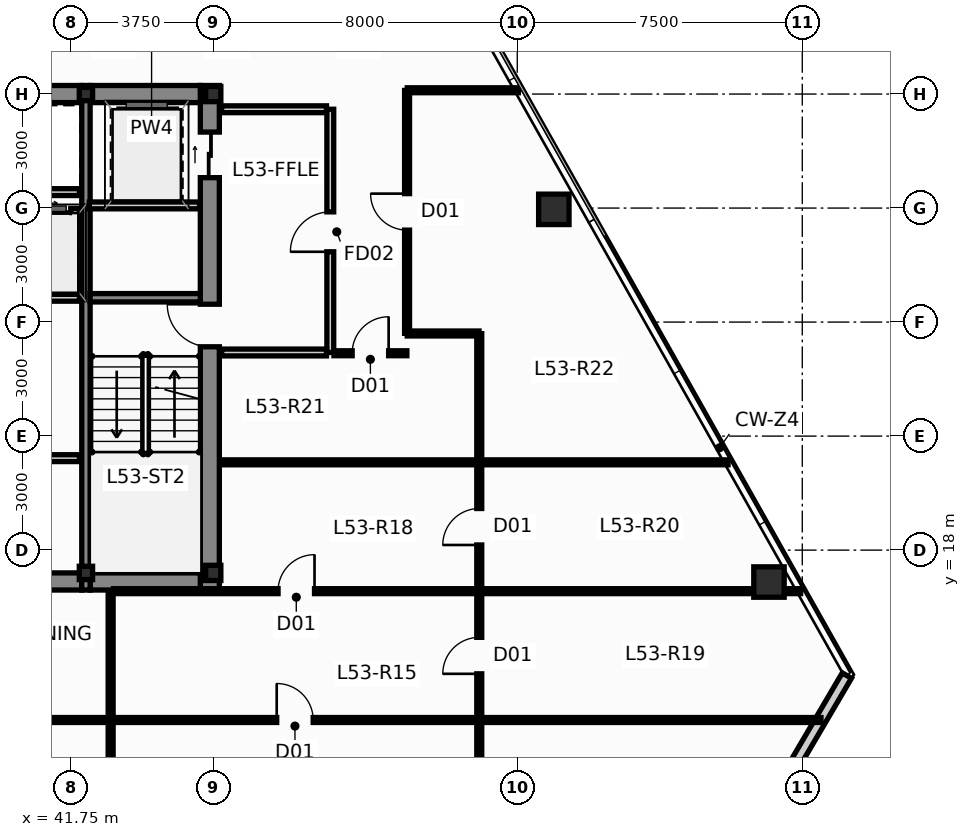
"""IFC4 building model, lengths in metres.
Left out: names, types, materials, properties, quantities, classifications, styles, units other than length and angle.
Written with IfcOpenShell. Run it as: python <this file> out.ifc"""

import sys

from ifc_helpers import new_model, si_unit, direction, frame, frame_2d, origin, origin_2d, place, context, subcontext, project, spatial, rectangle, hollow_rectangle, i_section, extrude, source, transform, mapped, element, fill, save


model = new_model("IFC4")
c1 = context("Model", 3, precision=1e-05, world=origin(), true_north=direction((0.0, 1.0)))
c2 = subcontext(c1, "Body", "Model", "MODEL_VIEW")
j1 = project(units=[si_unit("LENGTHUNIT", "METRE"), si_unit("PLANEANGLEUNIT", "RADIAN")], contexts=[c1])
p1 = place(None, origin())
s1 = spatial("IfcSite", under=j1, at=p1, CompositionType="ELEMENT")
p2 = place(p1, origin())
s2 = spatial("IfcBuilding", under=s1, at=p2, CompositionType="ELEMENT")
p3 = place(p2, frame((0.0, 0.0, 202.3)))
s3 = spatial("IfcBuildingStorey", under=s2, at=p3, CompositionType="ELEMENT", Elevation=202.3)
m1 = source(origin(), c2, "Body", "SweptSolid", [
    extrude(i_section(OverallWidth=0.4, OverallDepth=0.4, WebThickness=0.02, FlangeThickness=0.032, at=origin_2d()), origin(), (0.0, 0.0, 1.0), 3.65),
])
for number, where, z_axis, x_axis in (
    (1, (45.5, 17.4, 0.0), (0.0, 0.0, 1.0), (1.0, 0.0, 0.0)),
    (2, (45.5, 30.0, 0.0), (0.0, 0.0, 1.0), (1.0, 0.0, 0.0)),
):
    element("IfcColumn", number, at=place(p3, frame(where, z_axis=z_axis, x_axis=x_axis)), inside=s3, PredefinedType="COLUMN", context=c2, shape_type="MappedRepresentation", body=[
        mapped(m1, transform((0.0, 0.0, 0.0), scale=1.0)),
    ])
m2 = source(origin(), c2, "Body", "SweptSolid", [
    extrude(hollow_rectangle(XDim=0.35, YDim=0.35, WallThickness=0.016, at=origin_2d()), origin(), (0.0, 0.0, 1.0), 3.65),
])
for number, where, z_axis, x_axis in (
    (3, (42.15, 17.4, 0.0), (0.0, 0.0, 1.0), (1.0, 0.0, 0.0)),
    (4, (42.15, 30.0, 0.0), (0.0, 0.0, 1.0), (1.0, 0.0, 0.0)),
):
    element("IfcColumn", number, at=place(p3, frame(where, z_axis=z_axis, x_axis=x_axis)), inside=s3, PredefinedType="COLUMN", context=c2, shape_type="MappedRepresentation", body=[
        mapped(m2, transform((0.0, 0.0, 0.0), scale=1.0)),
    ])
p4 = place(p3, frame((45.41, 16.95, 0.0), z_axis=(0.0, 0.0, 1.0), x_axis=(0.0, 1.0, 0.0)))
e5 = element("IfcWall", 5, at=p4, inside=s3, PredefinedType="SHEAR", context=c2, shape_type="SweptSolid", body=[
    extrude(rectangle(XDim=13.275, YDim=0.5, at=frame_2d((6.638, 0.0))), origin(), (0.0, 0.0, 1.0), 3.65),
])
p5 = place(p4, frame((6.4, 0.0, 0.0)))
e6 = element("IfcOpeningElement", 6, at=p5, cuts=e5, PredefinedType="OPENING", context=c2, shape_type="SweptSolid", body=[
    extrude(rectangle(XDim=1.12, YDim=2.15, at=frame_2d((0.56, 1.075))), frame((0.0, 0.262, 0.0), z_axis=(0.0, -1.0, 0.0), x_axis=(1.0, 0.0, 0.0)), (0.0, 0.0, 1.0), 0.524),
])
p6 = place(p4, frame((10.85, 0.0, 0.0)))
e7 = element("IfcOpeningElement", 7, at=p6, cuts=e5, PredefinedType="OPENING", context=c2, shape_type="SweptSolid", body=[
    extrude(rectangle(XDim=1.2, YDim=2.2, at=frame_2d((0.6, 1.1))), frame((0.0, 0.262, 0.0), z_axis=(0.0, -1.0, 0.0), x_axis=(1.0, 0.0, 0.0)), (0.0, 0.0, 1.0), 0.524),
])
p7 = place(p3, frame((33.96, 17.175, 0.0), z_axis=(0.0, 0.0, 1.0), x_axis=(1.0, 0.0, 0.0)))
e8 = element("IfcWall", 8, at=p7, inside=s3, PredefinedType="SHEAR", context=c2, shape_type="SweptSolid", body=[
    extrude(rectangle(XDim=8.08, YDim=0.45, at=frame_2d((4.04, 0.0))), origin(), (0.0, 0.0, 1.0), 3.65),
])
p8 = place(p3, frame((42.26, 17.175, 0.0), z_axis=(0.0, 0.0, 1.0), x_axis=(1.0, 0.0, 0.0)))
e9 = element("IfcWall", 9, at=p8, inside=s3, PredefinedType="SHEAR", context=c2, shape_type="SweptSolid", body=[
    extrude(rectangle(XDim=2.9, YDim=0.45, at=frame_2d((1.45, 0.0))), origin(), (0.0, 0.0, 1.0), 3.65),
])
p9 = place(p3, frame((40.16, 30.0, 0.0), z_axis=(0.0, 0.0, 1.0), x_axis=(1.0, 0.0, 0.0)))
e10 = element("IfcWall", 10, at=p9, inside=s3, PredefinedType="SHEAR", context=c2, shape_type="SweptSolid", body=[
    extrude(rectangle(XDim=1.88, YDim=0.45, at=frame_2d((0.94, 0.0))), origin(), (0.0, 0.0, 1.0), 3.65),
])
p10 = place(p3, frame((42.26, 30.0, 0.0), z_axis=(0.0, 0.0, 1.0), x_axis=(1.0, 0.0, 0.0)))
e11 = element("IfcWall", 11, at=p10, inside=s3, PredefinedType="SHEAR", context=c2, shape_type="SweptSolid", body=[
    extrude(rectangle(XDim=2.9, YDim=0.45, at=frame_2d((1.45, 0.0))), origin(), (0.0, 0.0, 1.0), 3.65),
])
p11 = place(p3, frame((42.15, 16.95, 0.0), z_axis=(0.0, 0.0, 1.0), x_axis=(0.0, 1.0, 0.0)))
e12 = element("IfcWall", 12, at=p11, inside=s3, PredefinedType="SHEAR", context=c2, shape_type="SweptSolid", body=[
    extrude(rectangle(XDim=13.275, YDim=0.22, at=frame_2d((6.638, 0.0))), origin(), (0.0, 0.0, 1.0), 3.65),
])
p12 = place(p3, frame((42.26, 24.64, 0.0), z_axis=(0.0, 0.0, 1.0), x_axis=(1.0, 0.0, 0.0)))
e13 = element("IfcWall", 13, at=p12, inside=s3, PredefinedType="SHEAR", context=c2, shape_type="SweptSolid", body=[
    extrude(rectangle(XDim=2.9, YDim=0.22, at=frame_2d((1.45, 0.0))), origin(), (0.0, 0.0, 1.0), 3.65),
])
m3 = source(origin(), c2, "Body", "SweptSolid", [
    extrude(hollow_rectangle(XDim=0.8, YDim=0.8, WallThickness=0.045, at=origin_2d()), origin(), (0.0, 0.0, 1.0), 3.651),
])
p13 = place(p3, frame((60.124, 17.16, 0.0), z_axis=(-0.010431795422, -0.021532295679, 0.999713727968), x_axis=(0.899947055326, -0.435999194506, 0.0)))
e14 = element("IfcColumn", 14, at=p13, inside=s3, PredefinedType="COLUMN", context=c2, shape_type="MappedRepresentation", body=[
    mapped(m3, transform((0.0, 0.0, 0.0), scale=1.0)),
])
m4 = source(origin(), c2, "Body", "SweptSolid", [
    extrude(hollow_rectangle(XDim=0.8, YDim=0.8, WallThickness=0.045, at=origin_2d()), origin(), (0.0, 0.0, 1.0), 3.651),
])
p14 = place(p3, frame((54.462, 26.967, 0.0), z_axis=(-0.014913313399, -0.013776424037, 0.999793880369), x_axis=(0.678553674548, -0.734550822447, 0.0)))
e15 = element("IfcColumn", 15, at=p14, inside=s3, PredefinedType="COLUMN", context=c2, shape_type="MappedRepresentation", body=[
    mapped(m4, transform((0.0, 0.0, 0.0), scale=1.0)),
])
p15 = place(p3, frame((62.173, 14.699, 0.0), z_axis=(0.0, 0.0, 1.0), x_axis=(-0.506361908282, -0.862321064245, 0.0)))
e16 = element("IfcWall", 16, at=p15, inside=s3, PredefinedType="STANDARD", context=c2, shape_type="SweptSolid", body=[
    extrude(rectangle(XDim=8.171, YDim=0.28, at=frame_2d((4.086, 0.0))), origin(), (0.0, 0.0, 1.0), 3.4),
])
p16 = place(p15, frame((2.89, 0.0, 0.9)))
e17 = element("IfcOpeningElement", 17, at=p16, cuts=e16, PredefinedType="OPENING", context=c2, shape_type="SweptSolid", body=[
    extrude(rectangle(XDim=1.5, YDim=1.8, at=frame_2d((0.75, 0.9))), frame((0.0, 0.152, 0.0), z_axis=(0.0, -1.0, 0.0), x_axis=(1.0, 0.0, 0.0)), (0.0, 0.0, 1.0), 0.304),
])
p17 = place(p3, frame((40.28, 26.9, 0.0), z_axis=(0.0, 0.0, 1.0), x_axis=(1.0, 0.0, 0.0)))
e18 = element("IfcWall", 18, at=p17, inside=s3, PredefinedType="PARTITIONING", context=c2, shape_type="SweptSolid", body=[
    extrude(rectangle(XDim=1.7, YDim=0.18, at=frame_2d((0.85, 0.0))), origin(), (0.0, 0.0, 1.0), 3.4),
])
p18 = place(p17, frame((0.32, 0.0, 0.0)))
e19 = element("IfcOpeningElement", 19, at=p18, cuts=e18, PredefinedType="OPENING", context=c2, shape_type="SweptSolid", body=[
    extrude(rectangle(XDim=1.15, YDim=2.2, at=frame_2d((0.575, 1.1))), frame((0.0, 0.102, 0.0), z_axis=(0.0, -1.0, 0.0), x_axis=(1.0, 0.0, 0.0)), (0.0, 0.0, 1.0), 0.204),
])
p19 = place(p3, frame((40.2, 24.64, 0.0), z_axis=(0.0, 0.0, 1.0), x_axis=(1.0, 0.0, 0.0)))
e20 = element("IfcWall", 20, at=p19, inside=s3, PredefinedType="PARTITIONING", context=c2, shape_type="SweptSolid", body=[
    extrude(rectangle(XDim=1.78, YDim=0.18, at=frame_2d((0.89, 0.0))), origin(), (0.0, 0.0, 1.0), 3.4),
])
p20 = place(p3, frame((40.22, 27.42, 0.0), z_axis=(0.0, 0.0, 1.0), x_axis=(1.0, 0.0, 0.0)))
e21 = element("IfcWall", 21, at=p20, inside=s3, PredefinedType="PARTITIONING", context=c2, shape_type="SweptSolid", body=[
    extrude(rectangle(XDim=1.76, YDim=0.18, at=frame_2d((0.88, 0.0))), origin(), (0.0, 0.0, 1.0), 3.4),
])
p21 = place(p3, frame((48.58, 23.2, 0.0), z_axis=(0.0, 0.0, 1.0), x_axis=(0.0, 1.0, 0.0)))
e22 = element("IfcWall", 22, at=p21, inside=s3, PredefinedType="PARTITIONING", context=c2, shape_type="SweptSolid", body=[
    extrude(rectangle(XDim=6.4, YDim=0.18, at=frame_2d((3.2, 0.0))), origin(), (0.0, 0.0, 1.0), 3.078),
])
p22 = place(p21, frame((2.65, 0.0, 0.0)))
e23 = element("IfcOpeningElement", 23, at=p22, cuts=e22, PredefinedType="OPENING", context=c2, shape_type="SweptSolid", body=[
    extrude(rectangle(XDim=1.05, YDim=2.15, at=frame_2d((0.525, 1.075))), frame((0.0, 0.102, 0.0), z_axis=(0.0, -1.0, 0.0), x_axis=(1.0, 0.0, 0.0)), (0.0, 0.0, 1.0), 0.204),
])
p23 = place(p3, frame((45.72, 23.2, 0.0), z_axis=(0.0, 0.0, 1.0), x_axis=(1.0, 0.0, 0.0)))
e24 = element("IfcWall", 24, at=p23, inside=s3, PredefinedType="PARTITIONING", context=c2, shape_type="SweptSolid", body=[
    extrude(rectangle(XDim=2.76, YDim=0.18, at=frame_2d((1.38, 0.0))), origin(), (0.0, 0.0, 1.0), 3.4),
])
p24 = place(p3, frame((45.72, 29.6, 0.0), z_axis=(0.0, 0.0, 1.0), x_axis=(1.0, 0.0, 0.0)))
e25 = element("IfcWall", 25, at=p24, inside=s3, PredefinedType="PARTITIONING", context=c2, shape_type="SweptSolid", body=[
    extrude(rectangle(XDim=2.76, YDim=0.18, at=frame_2d((1.38, 0.0))), origin(), (0.0, 0.0, 1.0), 2.925),
])
p25 = place(p3, frame((42.24, 27.07, 0.0), z_axis=(0.0, 0.0, 1.0), x_axis=(1.0, 0.0, 0.0)))
e26 = element("IfcWall", 26, at=p25, inside=s3, PredefinedType="PARTITIONING", context=c2, shape_type="SweptSolid", body=[
    extrude(rectangle(XDim=2.9, YDim=0.18, at=frame_2d((1.45, 0.0))), origin(), (0.0, 0.0, 1.0), 3.4),
])
p26 = place(p3, frame((40.22, 20.42, 0.0), z_axis=(0.0, 0.0, 1.0), x_axis=(1.0, 0.0, 0.0)))
e27 = element("IfcWall", 27, at=p26, inside=s3, PredefinedType="PARTITIONING", context=c2, shape_type="SweptSolid", body=[
    extrude(rectangle(XDim=1.76, YDim=0.18, at=frame_2d((0.88, 0.0))), origin(), (0.0, 0.0, 1.0), 3.4),
])
p27 = place(p3, frame((42.805, 13.53, 0.0), z_axis=(0.0, 0.0, 1.0), x_axis=(1.0, 0.0, 0.0)))
e28 = element("IfcWall", 28, at=p27, inside=s3, PredefinedType="PARTITIONING", context=c2, shape_type="SweptSolid", body=[
    extrude(rectangle(XDim=9.69, YDim=0.13, at=frame_2d((4.845, 0.0))), origin(), (0.0, 0.0, 1.0), 3.078),
])
p28 = place(p27, frame((4.365, 0.0, 0.0)))
e29 = element("IfcOpeningElement", 29, at=p28, cuts=e28, PredefinedType="OPENING", context=c2, shape_type="SweptSolid", body=[
    extrude(rectangle(XDim=0.96, YDim=2.15, at=frame_2d((0.48, 1.075))), frame((0.0, 0.077, 0.0), z_axis=(0.0, -1.0, 0.0), x_axis=(1.0, 0.0, 0.0)), (0.0, 0.0, 1.0), 0.154),
])
p29 = place(p3, frame((42.875, 16.92, 0.0), z_axis=(0.0, 0.0, 1.0), x_axis=(1.0, 0.0, 0.0)))
e30 = element("IfcWall", 30, at=p29, inside=s3, PredefinedType="PARTITIONING", context=c2, shape_type="SweptSolid", body=[
    extrude(rectangle(XDim=9.62, YDim=0.13, at=frame_2d((4.81, 0.0))), origin(), (0.0, 0.0, 1.0), 2.925),
])
p30 = place(p29, frame((4.33, 0.0, 0.0)))
e31 = element("IfcOpeningElement", 31, at=p30, cuts=e30, PredefinedType="OPENING", context=c2, shape_type="SweptSolid", body=[
    extrude(rectangle(XDim=0.96, YDim=2.15, at=frame_2d((0.48, 1.075))), frame((0.0, 0.077, 0.0), z_axis=(0.0, -1.0, 0.0), x_axis=(1.0, 0.0, 0.0)), (0.0, 0.0, 1.0), 0.154),
])
p31 = place(p3, frame((33.205, 13.53, 0.0), z_axis=(0.0, 0.0, 1.0), x_axis=(1.0, 0.0, 0.0)))
e32 = element("IfcWall", 32, at=p31, inside=s3, PredefinedType="PARTITIONING", context=c2, shape_type="SweptSolid", body=[
    extrude(rectangle(XDim=9.59, YDim=0.13, at=frame_2d((4.795, 0.0))), origin(), (0.0, 0.0, 1.0), 3.078),
])
p32 = place(p31, frame((4.315, 0.0, 0.0)))
e33 = element("IfcOpeningElement", 33, at=p32, cuts=e32, PredefinedType="OPENING", context=c2, shape_type="SweptSolid", body=[
    extrude(rectangle(XDim=0.96, YDim=2.15, at=frame_2d((0.48, 1.075))), frame((0.0, 0.077, 0.0), z_axis=(0.0, -1.0, 0.0), x_axis=(1.0, 0.0, 0.0)), (0.0, 0.0, 1.0), 0.154),
])
p33 = place(p3, frame((52.505, 13.53, 0.0), z_axis=(0.0, 0.0, 1.0), x_axis=(1.0, 0.0, 0.0)))
e34 = element("IfcWall", 34, at=p33, inside=s3, PredefinedType="PARTITIONING", context=c2, shape_type="SweptSolid", body=[
    extrude(rectangle(XDim=8.987, YDim=0.13, at=frame_2d((4.494, 0.0))), origin(), (0.0, 0.0, 1.0), 3.4),
])
p34 = place(p3, frame((52.505, 16.92, 0.0), z_axis=(0.0, 0.0, 1.0), x_axis=(1.0, 0.0, 0.0)))
e35 = element("IfcWall", 35, at=p34, inside=s3, PredefinedType="PARTITIONING", context=c2, shape_type="SweptSolid", body=[
    extrude(rectangle(XDim=8.452, YDim=0.13, at=frame_2d((4.226, 0.0))), origin(), (0.0, 0.0, 1.0), 2.925),
])
p35 = place(p3, frame((45.675, 20.31, 0.0), z_axis=(0.0, 0.0, 1.0), x_axis=(1.0, 0.0, 0.0)))
e36 = element("IfcWall", 36, at=p35, inside=s3, PredefinedType="PARTITIONING", context=c2, shape_type="SweptSolid", body=[
    extrude(rectangle(XDim=6.82, YDim=0.13, at=frame_2d((3.41, 0.0))), origin(), (0.0, 0.0, 1.0), 3.4),
])
p36 = place(p3, frame((52.505, 20.31, 0.0), z_axis=(0.0, 0.0, 1.0), x_axis=(1.0, 0.0, 0.0)))
e37 = element("IfcWall", 37, at=p36, inside=s3, PredefinedType="PARTITIONING", context=c2, shape_type="SweptSolid", body=[
    extrude(rectangle(XDim=6.542, YDim=0.13, at=frame_2d((3.271, 0.0))), origin(), (0.0, 0.0, 1.0), 3.4),
])
p37 = place(p3, frame((50.6, 23.705, 0.0), z_axis=(0.0, 0.0, 1.0), x_axis=(0.0, 1.0, 0.0)))
e38 = element("IfcWall", 38, at=p37, inside=s3, PredefinedType="PARTITIONING", context=c2, shape_type="SweptSolid", body=[
    extrude(rectangle(XDim=6.39, YDim=0.13, at=frame_2d((3.195, 0.0))), origin(), (0.0, 0.0, 1.0), 3.078),
])
p38 = place(p37, frame((2.715, 0.0, 0.0)))
e39 = element("IfcOpeningElement", 39, at=p38, cuts=e38, PredefinedType="OPENING", context=c2, shape_type="SweptSolid", body=[
    extrude(rectangle(XDim=0.96, YDim=2.15, at=frame_2d((0.48, 1.075))), frame((0.0, 0.077, 0.0), z_axis=(0.0, -1.0, 0.0), x_axis=(1.0, 0.0, 0.0)), (0.0, 0.0, 1.0), 0.154),
])
p39 = place(p3, frame((42.8, 13.535, 0.0), z_axis=(0.0, 0.0, 1.0), x_axis=(0.0, 1.0, 0.0)))
e40 = element("IfcWall", 40, at=p39, inside=s3, PredefinedType="PARTITIONING", context=c2, shape_type="SweptSolid", body=[
    extrude(rectangle(XDim=3.31, YDim=0.13, at=frame_2d((1.655, 0.0))), origin(), (0.0, 0.0, 1.0), 3.4),
])
p40 = place(p3, frame((52.5, 13.535, 0.0), z_axis=(0.0, 0.0, 1.0), x_axis=(0.0, 1.0, 0.0)))
e41 = element("IfcWall", 41, at=p40, inside=s3, PredefinedType="PARTITIONING", context=c2, shape_type="SweptSolid", body=[
    extrude(rectangle(XDim=3.38, YDim=0.13, at=frame_2d((1.69, 0.0))), origin(), (0.0, 0.0, 1.0), 3.4),
])
p41 = place(p40, frame((1.21, 0.0, 0.0)))
e42 = element("IfcOpeningElement", 42, at=p41, cuts=e41, PredefinedType="OPENING", context=c2, shape_type="SweptSolid", body=[
    extrude(rectangle(XDim=0.96, YDim=2.15, at=frame_2d((0.48, 1.075))), frame((0.0, 0.077, 0.0), z_axis=(0.0, -1.0, 0.0), x_axis=(1.0, 0.0, 0.0)), (0.0, 0.0, 1.0), 0.154),
])
p42 = place(p3, frame((52.5, 23.695, 0.0), z_axis=(0.0, 0.0, 1.0), x_axis=(0.0, -1.0, 0.0)))
e43 = element("IfcWall", 43, at=p42, inside=s3, PredefinedType="PARTITIONING", context=c2, shape_type="SweptSolid", body=[
    extrude(rectangle(XDim=3.38, YDim=0.13, at=frame_2d((1.69, 0.0))), origin(), (0.0, 0.0, 1.0), 3.078),
])
p43 = place(p3, frame((42.8, 10.145, 0.0), z_axis=(0.0, 0.0, 1.0), x_axis=(0.0, 1.0, 0.0)))
e44 = element("IfcWall", 44, at=p43, inside=s3, PredefinedType="PARTITIONING", context=c2, shape_type="SweptSolid", body=[
    extrude(rectangle(XDim=3.38, YDim=0.13, at=frame_2d((1.69, 0.0))), origin(), (0.0, 0.0, 1.0), 3.4),
])
p44 = place(p43, frame((1.21, 0.0, 0.0)))
e45 = element("IfcOpeningElement", 45, at=p44, cuts=e44, PredefinedType="OPENING", context=c2, shape_type="SweptSolid", body=[
    extrude(rectangle(XDim=0.96, YDim=2.15, at=frame_2d((0.48, 1.075))), frame((0.0, 0.077, 0.0), z_axis=(0.0, -1.0, 0.0), x_axis=(1.0, 0.0, 0.0)), (0.0, 0.0, 1.0), 0.154),
])
p45 = place(p3, frame((52.5, 10.145, 0.0), z_axis=(0.0, 0.0, 1.0), x_axis=(0.0, 1.0, 0.0)))
e46 = element("IfcWall", 46, at=p45, inside=s3, PredefinedType="PARTITIONING", context=c2, shape_type="SweptSolid", body=[
    extrude(rectangle(XDim=3.38, YDim=0.13, at=frame_2d((1.69, 0.0))), origin(), (0.0, 0.0, 1.0), 3.4),
])
p46 = place(p45, frame((1.21, 0.0, 0.0)))
e47 = element("IfcOpeningElement", 47, at=p46, cuts=e46, PredefinedType="OPENING", context=c2, shape_type="SweptSolid", body=[
    extrude(rectangle(XDim=0.96, YDim=2.15, at=frame_2d((0.48, 1.075))), frame((0.0, 0.077, 0.0), z_axis=(0.0, -1.0, 0.0), x_axis=(1.0, 0.0, 0.0)), (0.0, 0.0, 1.0), 0.154),
])
p47 = place(p3, frame((52.5, 16.925, 0.0), z_axis=(0.0, 0.0, 1.0), x_axis=(0.0, 1.0, 0.0)))
e48 = element("IfcWall", 48, at=p47, inside=s3, PredefinedType="PARTITIONING", context=c2, shape_type="SweptSolid", body=[
    extrude(rectangle(XDim=3.38, YDim=0.13, at=frame_2d((1.69, 0.0))), origin(), (0.0, 0.0, 1.0), 3.078),
])
p48 = place(p47, frame((1.21, 0.0, 0.0)))
e49 = element("IfcOpeningElement", 49, at=p48, cuts=e48, PredefinedType="OPENING", context=c2, shape_type="SweptSolid", body=[
    extrude(rectangle(XDim=0.96, YDim=2.15, at=frame_2d((0.48, 1.075))), frame((0.0, 0.077, 0.0), z_axis=(0.0, -1.0, 0.0), x_axis=(1.0, 0.0, 0.0)), (0.0, 0.0, 1.0), 0.154),
])
p49 = place(p3, frame((50.605, 30.1, 0.0), z_axis=(0.0, 0.0, 1.0), x_axis=(1.0, 0.0, 0.0)))
e50 = element("IfcWall", 50, at=p49, inside=s3, PredefinedType="PARTITIONING", context=c2, shape_type="SweptSolid", body=[
    extrude(rectangle(XDim=2.925, YDim=0.13, at=frame_2d((1.462, 0.0))), origin(), (0.0, 0.0, 1.0), 3.4),
])
p50 = place(p3, frame((48.675, 23.18, 0.0), z_axis=(0.0, 0.0, 1.0), x_axis=(1.0, 0.0, 0.0)))
e51 = element("IfcWall", 51, at=p50, inside=s3, PredefinedType="PARTITIONING", context=c2, shape_type="SweptSolid", body=[
    extrude(rectangle(XDim=1.92, YDim=0.13, at=frame_2d((0.96, 0.0))), origin(), (0.0, 0.0, 1.0), 3.4),
])
p51 = place(p50, frame((0.48, 0.0, 0.0)))
e52 = element("IfcOpeningElement", 52, at=p51, cuts=e51, PredefinedType="OPENING", context=c2, shape_type="SweptSolid", body=[
    extrude(rectangle(XDim=0.96, YDim=2.15, at=frame_2d((0.48, 1.075))), frame((0.0, 0.077, 0.0), z_axis=(0.0, -1.0, 0.0), x_axis=(1.0, 0.0, 0.0)), (0.0, 0.0, 1.0), 0.154),
])
p52 = place(p3, frame((50.605, 23.7, 0.0), z_axis=(0.0, 0.0, 1.0), x_axis=(1.0, 0.0, 0.0)))
e53 = element("IfcWall", 53, at=p52, inside=s3, PredefinedType="PARTITIONING", context=c2, shape_type="SweptSolid", body=[
    extrude(rectangle(XDim=1.89, YDim=0.13, at=frame_2d((0.945, 0.0))), origin(), (0.0, 0.0, 1.0), 3.4),
])
p53 = place(p5, origin())
e54 = element("IfcDoor", 54, at=p53, inside=s3, OperationType="SINGLE_SWING_RIGHT", PredefinedType="DOOR", context=c2, shape_type="SweptSolid", body=[
    extrude(rectangle(XDim=1.12, YDim=2.15, at=frame_2d((0.56, 1.075))), frame((0.0, 0.025, 0.0), z_axis=(0.0, -1.0, 0.0), x_axis=(1.0, 0.0, 0.0)), (0.0, 0.0, 1.0), 0.05),
])
fill(e6, e54)
p54 = place(p6, origin())
e55 = element("IfcDoor", 55, at=p54, inside=s3, OperationType="SLIDING_TO_RIGHT", PredefinedType="DOOR", context=c2, shape_type="SweptSolid", body=[
    extrude(rectangle(XDim=1.2, YDim=2.2, at=frame_2d((0.6, 1.1))), frame((0.0, 0.025, 0.0), z_axis=(0.0, -1.0, 0.0), x_axis=(1.0, 0.0, 0.0)), (0.0, 0.0, 1.0), 0.05),
])
fill(e7, e55)
p55 = place(p18, origin())
e56 = element("IfcDoor", 56, at=p55, inside=s3, OperationType="SLIDING_TO_LEFT", PredefinedType="DOOR", context=c2, shape_type="SweptSolid", body=[
    extrude(rectangle(XDim=1.15, YDim=2.2, at=frame_2d((0.575, 1.1))), frame((0.0, 0.025, 0.0), z_axis=(0.0, -1.0, 0.0), x_axis=(1.0, 0.0, 0.0)), (0.0, 0.0, 1.0), 0.05),
])
fill(e19, e56)
p56 = place(p22, origin())
e57 = element("IfcDoor", 57, at=p56, inside=s3, OperationType="SINGLE_SWING_LEFT", PredefinedType="DOOR", context=c2, shape_type="SweptSolid", body=[
    extrude(rectangle(XDim=1.05, YDim=2.15, at=frame_2d((0.525, 1.075))), frame((0.0, 0.025, 0.0), z_axis=(0.0, -1.0, 0.0), x_axis=(1.0, 0.0, 0.0)), (0.0, 0.0, 1.0), 0.05),
])
fill(e23, e57)
p57 = place(p28, origin())
e58 = element("IfcDoor", 58, at=p57, inside=s3, OperationType="SINGLE_SWING_LEFT", PredefinedType="DOOR", context=c2, shape_type="SweptSolid", body=[
    extrude(rectangle(XDim=0.96, YDim=2.15, at=frame_2d((0.48, 1.075))), frame((0.0, 0.025, 0.0), z_axis=(0.0, -1.0, 0.0), x_axis=(1.0, 0.0, 0.0)), (0.0, 0.0, 1.0), 0.05),
])
fill(e29, e58)
p58 = place(p30, origin())
e59 = element("IfcDoor", 59, at=p58, inside=s3, OperationType="SINGLE_SWING_RIGHT", PredefinedType="DOOR", context=c2, shape_type="SweptSolid", body=[
    extrude(rectangle(XDim=0.96, YDim=2.15, at=frame_2d((0.48, 1.075))), frame((0.0, 0.025, 0.0), z_axis=(0.0, -1.0, 0.0), x_axis=(1.0, 0.0, 0.0)), (0.0, 0.0, 1.0), 0.05),
])
fill(e31, e59)
p59 = place(p38, origin())
e60 = element("IfcDoor", 60, at=p59, inside=s3, OperationType="SINGLE_SWING_RIGHT", PredefinedType="DOOR", context=c2, shape_type="SweptSolid", body=[
    extrude(rectangle(XDim=0.96, YDim=2.15, at=frame_2d((0.48, 1.075))), frame((0.0, 0.025, 0.0), z_axis=(0.0, -1.0, 0.0), x_axis=(1.0, 0.0, 0.0)), (0.0, 0.0, 1.0), 0.05),
])
fill(e39, e60)
p60 = place(p41, origin())
e61 = element("IfcDoor", 61, at=p60, inside=s3, OperationType="SINGLE_SWING_LEFT", PredefinedType="DOOR", context=c2, shape_type="SweptSolid", body=[
    extrude(rectangle(XDim=0.96, YDim=2.15, at=frame_2d((0.48, 1.075))), frame((0.0, 0.025, 0.0), z_axis=(0.0, -1.0, 0.0), x_axis=(1.0, 0.0, 0.0)), (0.0, 0.0, 1.0), 0.05),
])
fill(e42, e61)
p61 = place(p48, origin())
e62 = element("IfcDoor", 62, at=p61, inside=s3, OperationType="SINGLE_SWING_LEFT", PredefinedType="DOOR", context=c2, shape_type="SweptSolid", body=[
    extrude(rectangle(XDim=0.96, YDim=2.15, at=frame_2d((0.48, 1.075))), frame((0.0, 0.025, 0.0), z_axis=(0.0, -1.0, 0.0), x_axis=(1.0, 0.0, 0.0)), (0.0, 0.0, 1.0), 0.05),
])
fill(e49, e62)
p62 = place(p51, origin())
e63 = element("IfcDoor", 63, at=p62, inside=s3, OperationType="SINGLE_SWING_RIGHT", PredefinedType="DOOR", context=c2, shape_type="SweptSolid", body=[
    extrude(rectangle(XDim=0.96, YDim=2.15, at=frame_2d((0.48, 1.075))), frame((0.0, 0.025, 0.0), z_axis=(0.0, -1.0, 0.0), x_axis=(1.0, 0.0, 0.0)), (0.0, 0.0, 1.0), 0.05),
])
fill(e52, e63)
save(model, sys.argv[1])
